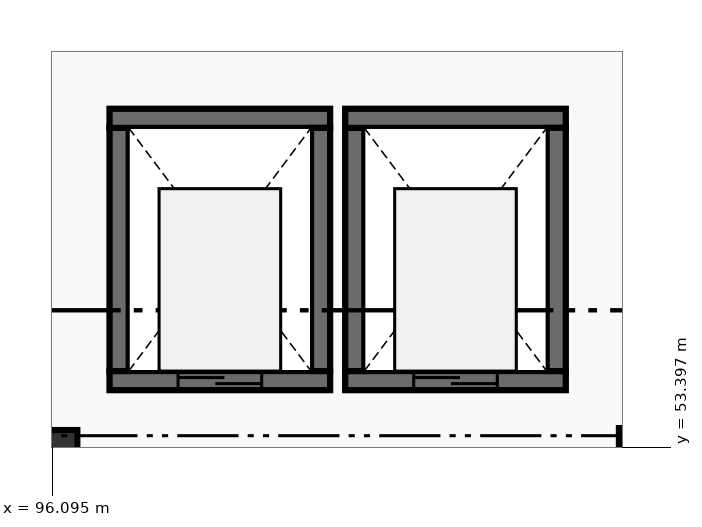
"""IFC4 building model, lengths in metres.
Left out: names, types, materials, properties, quantities, classifications, styles, units other than length and angle.
Written with IfcOpenShell. Run it as: python <this file> out.ifc"""

import sys

from ifc_helpers import new_model, si_unit, direction, frame, frame_2d, origin, origin_2d, place, context, subcontext, project, spatial, rectangle, extrude, element, fill, save


model = new_model("IFC4")
c1 = context("Model", 3, precision=1e-05, world=origin(), true_north=direction((0.0, 1.0)))
c2 = subcontext(c1, "Body", "Model", "MODEL_VIEW")
j1 = project(units=[si_unit("LENGTHUNIT", "METRE"), si_unit("PLANEANGLEUNIT", "RADIAN")], contexts=[c1])
p1 = place(None, origin())
s1 = spatial("IfcSite", under=j1, at=p1, CompositionType="ELEMENT")
p2 = place(p1, origin())
s2 = spatial("IfcBuilding", under=s1, at=p2, CompositionType="ELEMENT")
p3 = place(p2, frame((0.0, 0.0, -4.5)))
s3 = spatial("IfcBuildingStorey", under=s2, at=p3, CompositionType="ELEMENT", Elevation=-4.5)
p4 = place(p3, frame((96.0, 53.2, 0.0), z_axis=(0.0, 0.0, 1.0), x_axis=(1.0, 0.0, 0.0)))
e1 = element("IfcColumn", 1, at=p4, inside=s3, PredefinedType="COLUMN", context=c2, shape_type="SweptSolid", body=[
    extrude(rectangle(XDim=0.85, YDim=0.85, at=origin_2d()), origin(), (0.0, 0.0, 1.0), 4.5),
])
p5 = place(p3, frame((104.0, 53.2, 0.0), z_axis=(0.0, 0.0, 1.0), x_axis=(1.0, 0.0, 0.0)))
e2 = element("IfcColumn", 2, at=p5, inside=s3, PredefinedType="COLUMN", context=c2, shape_type="SweptSolid", body=[
    extrude(rectangle(XDim=0.9, YDim=0.9, at=origin_2d()), origin(), (0.0, 0.0, 1.0), 4.5),
])
p6 = place(p3, frame((99.75, 54.275, -1.35), z_axis=(0.0, 0.0, 1.0), x_axis=(-1.0, 0.0, 0.0)))
e3 = element("IfcWall", 3, at=p6, inside=s3, PredefinedType="SHEAR", context=c2, shape_type="SweptSolid", body=[
    extrude(rectangle(XDim=2.9, YDim=0.25, at=frame_2d((1.45, 0.0))), origin(), (0.0, 0.0, 1.0), 1.35),
])
p7 = place(p3, frame((96.975, 54.4, -1.35), z_axis=(0.0, 0.0, 1.0), x_axis=(0.0, 1.0, 0.0)))
e4 = element("IfcWall", 4, at=p7, inside=s3, PredefinedType="SHEAR", context=c2, shape_type="SweptSolid", body=[
    extrude(rectangle(XDim=3.2, YDim=0.25, at=frame_2d((1.6, 0.0))), origin(), (0.0, 0.0, 1.0), 1.35),
])
p8 = place(p3, frame((96.85, 57.725, -1.35), z_axis=(0.0, 0.0, 1.0), x_axis=(1.0, 0.0, 0.0)))
e5 = element("IfcWall", 5, at=p8, inside=s3, PredefinedType="SHEAR", context=c2, shape_type="SweptSolid", body=[
    extrude(rectangle(XDim=2.9, YDim=0.25, at=frame_2d((1.45, 0.0))), origin(), (0.0, 0.0, 1.0), 1.35),
])
p9 = place(p3, frame((99.625, 57.6, -1.35), z_axis=(0.0, 0.0, 1.0), x_axis=(0.0, -1.0, 0.0)))
e6 = element("IfcWall", 6, at=p9, inside=s3, PredefinedType="SHEAR", context=c2, shape_type="SweptSolid", body=[
    extrude(rectangle(XDim=3.2, YDim=0.25, at=frame_2d((1.6, 0.0))), origin(), (0.0, 0.0, 1.0), 1.35),
])
p10 = place(p3, frame((99.75, 54.275, 0.0), z_axis=(0.0, 0.0, 1.0), x_axis=(-1.0, 0.0, 0.0)))
e7 = element("IfcWall", 7, at=p10, inside=s3, PredefinedType="SHEAR", context=c2, shape_type="SweptSolid", body=[
    extrude(rectangle(XDim=2.9, YDim=0.25, at=frame_2d((1.45, 0.0))), origin(), (0.0, 0.0, 1.0), 4.5),
])
p11 = place(p10, frame((0.9, 0.0, 0.0)))
e8 = element("IfcOpeningElement", 8, at=p11, cuts=e7, PredefinedType="OPENING", context=c2, shape_type="SweptSolid", body=[
    extrude(rectangle(XDim=1.1, YDim=2.15, at=frame_2d((0.55, 1.075))), frame((0.0, 0.135, 0.0), z_axis=(0.0, -1.0, 0.0), x_axis=(1.0, 0.0, 0.0)), (0.0, 0.0, 1.0), 0.27),
])
p12 = place(p3, frame((96.975, 54.4, 0.0), z_axis=(0.0, 0.0, 1.0), x_axis=(0.0, 1.0, 0.0)))
e9 = element("IfcWall", 9, at=p12, inside=s3, PredefinedType="SHEAR", context=c2, shape_type="SweptSolid", body=[
    extrude(rectangle(XDim=3.2, YDim=0.25, at=frame_2d((1.6, 0.0))), origin(), (0.0, 0.0, 1.0), 4.5),
])
p13 = place(p3, frame((96.85, 57.725, 0.0), z_axis=(0.0, 0.0, 1.0), x_axis=(1.0, 0.0, 0.0)))
e10 = element("IfcWall", 10, at=p13, inside=s3, PredefinedType="SHEAR", context=c2, shape_type="SweptSolid", body=[
    extrude(rectangle(XDim=2.9, YDim=0.25, at=frame_2d((1.45, 0.0))), origin(), (0.0, 0.0, 1.0), 4.5),
])
p14 = place(p3, frame((99.625, 57.6, 0.0), z_axis=(0.0, 0.0, 1.0), x_axis=(0.0, -1.0, 0.0)))
e11 = element("IfcWall", 11, at=p14, inside=s3, PredefinedType="SHEAR", context=c2, shape_type="SweptSolid", body=[
    extrude(rectangle(XDim=3.2, YDim=0.25, at=frame_2d((1.6, 0.0))), origin(), (0.0, 0.0, 1.0), 4.5),
])
p15 = place(p3, frame((102.85, 54.275, -1.35), z_axis=(0.0, 0.0, 1.0), x_axis=(-1.0, 0.0, 0.0)))
e12 = element("IfcWall", 12, at=p15, inside=s3, PredefinedType="SHEAR", context=c2, shape_type="SweptSolid", body=[
    extrude(rectangle(XDim=2.9, YDim=0.25, at=frame_2d((1.45, 0.0))), origin(), (0.0, 0.0, 1.0), 1.35),
])
p16 = place(p3, frame((100.075, 54.4, -1.35), z_axis=(0.0, 0.0, 1.0), x_axis=(0.0, 1.0, 0.0)))
e13 = element("IfcWall", 13, at=p16, inside=s3, PredefinedType="SHEAR", context=c2, shape_type="SweptSolid", body=[
    extrude(rectangle(XDim=3.2, YDim=0.25, at=frame_2d((1.6, 0.0))), origin(), (0.0, 0.0, 1.0), 1.35),
])
p17 = place(p3, frame((99.95, 57.725, -1.35), z_axis=(0.0, 0.0, 1.0), x_axis=(1.0, 0.0, 0.0)))
e14 = element("IfcWall", 14, at=p17, inside=s3, PredefinedType="SHEAR", context=c2, shape_type="SweptSolid", body=[
    extrude(rectangle(XDim=2.9, YDim=0.25, at=frame_2d((1.45, 0.0))), origin(), (0.0, 0.0, 1.0), 1.35),
])
p18 = place(p3, frame((102.725, 57.6, -1.35), z_axis=(0.0, 0.0, 1.0), x_axis=(0.0, -1.0, 0.0)))
e15 = element("IfcWall", 15, at=p18, inside=s3, PredefinedType="SHEAR", context=c2, shape_type="SweptSolid", body=[
    extrude(rectangle(XDim=3.2, YDim=0.25, at=frame_2d((1.6, 0.0))), origin(), (0.0, 0.0, 1.0), 1.35),
])
p19 = place(p3, frame((102.85, 54.275, 0.0), z_axis=(0.0, 0.0, 1.0), x_axis=(-1.0, 0.0, 0.0)))
e16 = element("IfcWall", 16, at=p19, inside=s3, PredefinedType="SHEAR", context=c2, shape_type="SweptSolid", body=[
    extrude(rectangle(XDim=2.9, YDim=0.25, at=frame_2d((1.45, 0.0))), origin(), (0.0, 0.0, 1.0), 4.5),
])
p20 = place(p19, frame((0.9, 0.0, 0.0)))
e17 = element("IfcOpeningElement", 17, at=p20, cuts=e16, PredefinedType="OPENING", context=c2, shape_type="SweptSolid", body=[
    extrude(rectangle(XDim=1.1, YDim=2.15, at=frame_2d((0.55, 1.075))), frame((0.0, 0.135, 0.0), z_axis=(0.0, -1.0, 0.0), x_axis=(1.0, 0.0, 0.0)), (0.0, 0.0, 1.0), 0.27),
])
p21 = place(p3, frame((100.075, 54.4, 0.0), z_axis=(0.0, 0.0, 1.0), x_axis=(0.0, 1.0, 0.0)))
e18 = element("IfcWall", 18, at=p21, inside=s3, PredefinedType="SHEAR", context=c2, shape_type="SweptSolid", body=[
    extrude(rectangle(XDim=3.2, YDim=0.25, at=frame_2d((1.6, 0.0))), origin(), (0.0, 0.0, 1.0), 4.5),
])
p22 = place(p3, frame((99.95, 57.725, 0.0), z_axis=(0.0, 0.0, 1.0), x_axis=(1.0, 0.0, 0.0)))
e19 = element("IfcWall", 19, at=p22, inside=s3, PredefinedType="SHEAR", context=c2, shape_type="SweptSolid", body=[
    extrude(rectangle(XDim=2.9, YDim=0.25, at=frame_2d((1.45, 0.0))), origin(), (0.0, 0.0, 1.0), 4.5),
])
p23 = place(p3, frame((102.725, 57.6, 0.0), z_axis=(0.0, 0.0, 1.0), x_axis=(0.0, -1.0, 0.0)))
e20 = element("IfcWall", 20, at=p23, inside=s3, PredefinedType="SHEAR", context=c2, shape_type="SweptSolid", body=[
    extrude(rectangle(XDim=3.2, YDim=0.25, at=frame_2d((1.6, 0.0))), origin(), (0.0, 0.0, 1.0), 4.5),
])
p24 = place(p11, origin())
e21 = element("IfcDoor", 21, at=p24, inside=s3, OperationType="DOUBLE_DOOR_SLIDING", PredefinedType="DOOR", context=c2, shape_type="SweptSolid", body=[
    extrude(rectangle(XDim=1.1, YDim=2.15, at=frame_2d((0.55, 1.075))), frame((0.0, 0.025, 0.0), z_axis=(0.0, -1.0, 0.0), x_axis=(1.0, 0.0, 0.0)), (0.0, 0.0, 1.0), 0.05),
])
fill(e8, e21)
p25 = place(p20, origin())
e22 = element("IfcDoor", 22, at=p25, inside=s3, OperationType="DOUBLE_DOOR_SLIDING", PredefinedType="DOOR", context=c2, shape_type="SweptSolid", body=[
    extrude(rectangle(XDim=1.1, YDim=2.15, at=frame_2d((0.55, 1.075))), frame((0.0, 0.025, 0.0), z_axis=(0.0, -1.0, 0.0), x_axis=(1.0, 0.0, 0.0)), (0.0, 0.0, 1.0), 0.05),
])
fill(e17, e22)
save(model, sys.argv[1])
